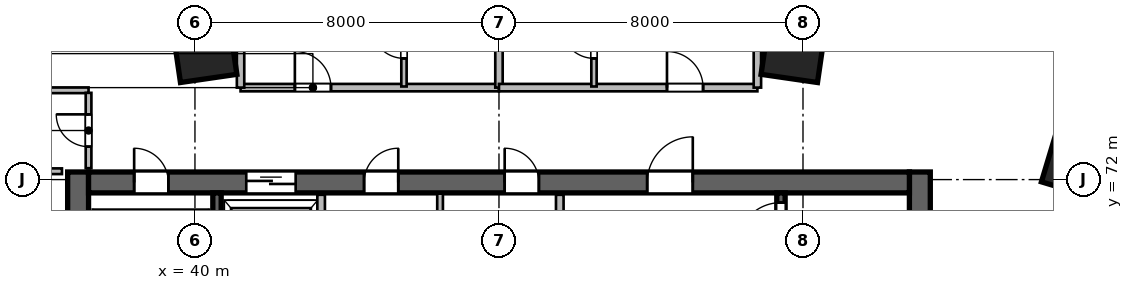
"""IFC4 building model, lengths in metres.
Left out: names, types, materials, properties, quantities, classifications, styles, units other than length and angle.
Written with IfcOpenShell. Run it as: python <this file> out.ifc"""

import sys

from ifc_helpers import new_model, si_unit, direction, frame, frame_2d, origin, origin_2d, place, context, subcontext, project, spatial, rectangle, extrude, source, transform, mapped, element, fill, save


model = new_model("IFC4")
c1 = context("Model", 3, precision=1e-05, world=origin(), true_north=direction((0.0, 1.0)))
c2 = subcontext(c1, "Body", "Model", "MODEL_VIEW")
j1 = project(units=[si_unit("LENGTHUNIT", "METRE"), si_unit("PLANEANGLEUNIT", "RADIAN")], contexts=[c1])
p1 = place(None, origin())
s1 = spatial("IfcSite", under=j1, at=p1, CompositionType="ELEMENT")
p2 = place(p1, origin())
s2 = spatial("IfcBuilding", under=s1, at=p2, CompositionType="ELEMENT")
p3 = place(p2, frame((0.0, 0.0, 42.6)))
s3 = spatial("IfcBuildingStorey", under=s2, at=p3, CompositionType="ELEMENT", Elevation=42.6)
m1 = source(origin(), c2, "Body", "SweptSolid", [
    extrude(rectangle(XDim=12.0, YDim=0.55, at=frame_2d((6.0, 0.0))), origin(), (0.0, 0.0, 1.0), 3.6),
])
for number, where, z_axis, x_axis in (
    (1, (36.925, 60.2, 0.0), (0.0, 0.0, 1.0), (0.0, 1.0, 0.0)),
    (2, (59.075, 60.2, 0.0), (0.0, 0.0, 1.0), (0.0, 1.0, 0.0)),
):
    element("IfcWall", number, at=place(p3, frame(where, z_axis=z_axis, x_axis=x_axis)), inside=s3, PredefinedType="SHEAR", context=c2, shape_type="MappedRepresentation", body=[
        mapped(m1, transform((0.0, 0.0, 0.0), scale=1.0)),
    ])
m2 = source(origin(), c2, "Body", "SweptSolid", [
    extrude(rectangle(XDim=21.6, YDim=0.55, at=frame_2d((10.8, 0.0))), origin(), (0.0, 0.0, 1.0), 3.6),
])
p4 = place(p3, frame((37.2, 71.925, 0.0), z_axis=(0.0, 0.0, 1.0), x_axis=(1.0, 0.0, 0.0)))
e3 = element("IfcWall", 3, at=p4, inside=s3, PredefinedType="SHEAR", context=c2, shape_type="MappedRepresentation", body=[
    mapped(m2, transform((0.0, 0.0, 0.0), scale=1.0)),
])
p5 = place(p4, frame((1.2, 0.0, 0.0)))
e4 = element("IfcOpeningElement", 4, at=p5, cuts=e3, PredefinedType="OPENING", context=c2, shape_type="SweptSolid", body=[
    extrude(rectangle(XDim=0.9, YDim=2.1, at=frame_2d((0.45, 1.05))), frame((0.0, 0.285, 0.0), z_axis=(0.0, -1.0, 0.0), x_axis=(1.0, 0.0, 0.0)), (0.0, 0.0, 1.0), 0.57),
])
p6 = place(p4, frame((14.7, 0.0, 0.0)))
e5 = element("IfcOpeningElement", 5, at=p6, cuts=e3, PredefinedType="OPENING", context=c2, shape_type="SweptSolid", body=[
    extrude(rectangle(XDim=1.2, YDim=2.15, at=frame_2d((0.6, 1.075))), frame((0.0, 0.285, 0.0), z_axis=(0.0, -1.0, 0.0), x_axis=(1.0, 0.0, 0.0)), (0.0, 0.0, 1.0), 0.57),
])
p7 = place(p4, frame((4.15, 0.0, 0.0)))
e6 = element("IfcOpeningElement", 6, at=p7, cuts=e3, PredefinedType="OPENING", context=c2, shape_type="SweptSolid", body=[
    extrude(rectangle(XDim=1.3, YDim=2.15, at=frame_2d((0.65, 1.075))), frame((0.0, 0.285, 0.0), z_axis=(0.0, -1.0, 0.0), x_axis=(1.0, 0.0, 0.0)), (0.0, 0.0, 1.0), 0.57),
])
p8 = place(p4, frame((7.25, 0.0, 0.0)))
e7 = element("IfcOpeningElement", 7, at=p8, cuts=e3, PredefinedType="OPENING", context=c2, shape_type="SweptSolid", body=[
    extrude(rectangle(XDim=0.9, YDim=2.1, at=frame_2d((0.45, 1.05))), frame((0.0, 0.285, 0.0), z_axis=(0.0, -1.0, 0.0), x_axis=(1.0, 0.0, 0.0)), (0.0, 0.0, 1.0), 0.57),
])
p9 = place(p4, frame((10.95, 0.0, 0.0)))
e8 = element("IfcOpeningElement", 8, at=p9, cuts=e3, PredefinedType="OPENING", context=c2, shape_type="SweptSolid", body=[
    extrude(rectangle(XDim=0.9, YDim=2.1, at=frame_2d((0.45, 1.05))), frame((0.0, 0.285, 0.0), z_axis=(0.0, -1.0, 0.0), x_axis=(1.0, 0.0, 0.0)), (0.0, 0.0, 1.0), 0.57),
])
m3 = source(origin(), c2, "Body", "SweptSolid", [
    extrude(rectangle(XDim=10.9, YDim=0.22, at=frame_2d((5.45, 0.0))), origin(), (0.0, 0.0, 1.0), 3.6),
])
p10 = place(p3, frame((40.58, 60.75, 0.0), z_axis=(0.0, 0.0, 1.0), x_axis=(0.0, 1.0, 0.0)))
e9 = element("IfcWall", 9, at=p10, inside=s3, PredefinedType="SHEAR", context=c2, shape_type="MappedRepresentation", body=[
    mapped(m3, transform((0.0, 0.0, 0.0), scale=1.0)),
])
p11 = place(p3, frame((55.42, 60.75, 0.0), z_axis=(0.0, 0.0, 1.0), x_axis=(0.0, 1.0, 0.0)))
e10 = element("IfcWall", 10, at=p11, inside=s3, PredefinedType="SHEAR", context=c2, shape_type="MappedRepresentation", body=[
    mapped(m3, transform((0.0, 0.0, 0.0), scale=1.0)),
])
p12 = place(p11, frame((9.495, 0.0, 0.0)))
e11 = element("IfcOpeningElement", 11, at=p12, cuts=e10, PredefinedType="OPENING", context=c2, shape_type="SweptSolid", body=[
    extrude(rectangle(XDim=1.15, YDim=2.15, at=frame_2d((0.575, 1.075))), frame((0.0, 0.12, 0.0), z_axis=(0.0, -1.0, 0.0), x_axis=(1.0, 0.0, 0.0)), (0.0, 0.0, 1.0), 0.24),
])
m4 = source(origin(), c2, "Body", "SweptSolid", [
    extrude(rectangle(XDim=1.5, YDim=1.5, at=origin_2d()), origin(), (0.0, 0.0, 1.0), 3.6),
])
for number, where, z_axis, x_axis in (
    (12, (40.253, 75.404, 0.0), (0.0, 0.0, 1.0), (-0.143, 0.99, 0.0)),
    (13, (55.747, 75.404, 0.0), (0.0, 0.0, 1.0), (0.143, 0.99, 0.0)),
    (14, (63.209, 72.442, 0.0), (0.0, 0.0, 1.0), (0.289, 0.957, 0.0)),
):
    element("IfcColumn", number, at=place(p3, frame(where, z_axis=z_axis, x_axis=x_axis)), inside=s3, PredefinedType="COLUMN", context=c2, shape_type="MappedRepresentation", body=[
        mapped(m4, transform((0.0, 0.0, 0.0), scale=1.0)),
    ])
m5 = source(origin(), c2, "Body", "SweptSolid", [
    extrude(rectangle(XDim=5.8, YDim=0.2, at=frame_2d((2.9, 0.0))), origin(), (0.0, 0.0, 1.0), 3.36),
])
p13 = place(p3, frame((49.6, 65.8, 0.0), z_axis=(0.0, 0.0, 1.0), x_axis=(0.0, 1.0, 0.0)))
e15 = element("IfcWall", 15, at=p13, inside=s3, PredefinedType="SOLIDWALL", context=c2, shape_type="MappedRepresentation", body=[
    mapped(m5, transform((0.0, 0.0, 0.0), scale=1.0)),
])
m6 = source(origin(), c2, "Body", "SweptSolid", [
    extrude(rectangle(XDim=3.2, YDim=0.2, at=frame_2d((1.6, 0.0))), origin(), (0.0, 0.0, 1.0), 3.36),
])
p14 = place(p3, frame((43.32, 68.4, 0.0), z_axis=(0.0, 0.0, 1.0), x_axis=(0.0, 1.0, 0.0)))
e16 = element("IfcWall", 16, at=p14, inside=s3, PredefinedType="SOLIDWALL", context=c2, shape_type="MappedRepresentation", body=[
    mapped(m6, transform((0.0, 0.0, 0.0), scale=1.0)),
])
m7 = source(origin(), c2, "Body", "SweptSolid", [
    extrude(rectangle(XDim=3.23, YDim=0.15, at=frame_2d((1.615, 0.0))), origin(), (0.0, 0.0, 1.0), 3.36),
])
p15 = place(p3, frame((46.45, 68.4, 0.0), z_axis=(0.0, 0.0, 1.0), x_axis=(0.0, 1.0, 0.0)))
e17 = element("IfcWall", 17, at=p15, inside=s3, PredefinedType="PARTITIONING", context=c2, shape_type="MappedRepresentation", body=[
    mapped(m7, transform((0.0, 0.0, 0.0), scale=1.0)),
])
m8 = source(origin(), c2, "Body", "SweptSolid", [
    extrude(rectangle(XDim=2.1, YDim=0.15, at=frame_2d((1.05, 0.0))), origin(), (0.0, 0.0, 1.0), 3.36),
])
p16 = place(p3, frame((34.4, 72.22, 0.0), z_axis=(0.0, 0.0, 1.0), x_axis=(1.0, 0.0, 0.0)))
e18 = element("IfcWall", 18, at=p16, inside=s3, PredefinedType="PARTITIONING", context=c2, shape_type="MappedRepresentation", body=[
    mapped(m8, transform((0.0, 0.0, 0.0), scale=1.0)),
])
m9 = source(origin(), c2, "Body", "SweptSolid", [
    extrude(rectangle(XDim=2.8, YDim=0.15, at=frame_2d((1.4, 0.0))), origin(), (0.0, 0.0, 1.0), 3.36),
])
p17 = place(p3, frame((34.4, 74.35, 0.0), z_axis=(0.0, 0.0, 1.0), x_axis=(1.0, 0.0, 0.0)))
e19 = element("IfcWall", 19, at=p17, inside=s3, PredefinedType="PARTITIONING", context=c2, shape_type="MappedRepresentation", body=[
    mapped(m9, transform((0.0, 0.0, 0.0), scale=1.0)),
])
m10 = source(origin(), c2, "Body", "SweptSolid", [
    extrude(rectangle(XDim=1.982, YDim=0.15, at=frame_2d((0.991, 0.0))), origin(), (0.0, 0.0, 1.0), 3.36),
])
p18 = place(p3, frame((37.2, 72.3, 0.0), z_axis=(0.0, 0.0, 1.0), x_axis=(0.0, 1.0, 0.0)))
e20 = element("IfcWall", 20, at=p18, inside=s3, PredefinedType="PARTITIONING", context=c2, shape_type="MappedRepresentation", body=[
    mapped(m10, transform((0.0, 0.0, 0.0), scale=1.0)),
])
p19 = place(p18, frame((0.566, 0.0, 0.0)))
e21 = element("IfcOpeningElement", 21, at=p19, cuts=e20, PredefinedType="OPENING", context=c2, shape_type="SweptSolid", body=[
    extrude(rectangle(XDim=0.85, YDim=2.1, at=frame_2d((0.425, 1.05))), frame((0.0, 0.085, 0.0), z_axis=(0.0, -1.0, 0.0), x_axis=(1.0, 0.0, 0.0)), (0.0, 0.0, 1.0), 0.17),
])
m11 = source(origin(), c2, "Body", "SweptSolid", [
    extrude(rectangle(XDim=6.8, YDim=0.195, at=frame_2d((3.4, 0.0))), origin(), (0.0, 0.0, 1.0), 3.36),
])
p20 = place(p3, frame((41.2, 74.42, 0.0), z_axis=(0.0, 0.0, 1.0), x_axis=(1.0, 0.0, 0.0)))
e22 = element("IfcWall", 22, at=p20, inside=s3, PredefinedType="PARTITIONING", context=c2, shape_type="MappedRepresentation", body=[
    mapped(m11, transform((0.0, 0.0, 0.0), scale=1.0)),
])
p21 = place(p20, frame((1.429, 0.0, 0.0)))
e23 = element("IfcOpeningElement", 23, at=p21, cuts=e22, PredefinedType="OPENING", context=c2, shape_type="SweptSolid", body=[
    extrude(rectangle(XDim=0.95, YDim=2.15, at=frame_2d((0.475, 1.075))), frame((0.0, 0.107, 0.0), z_axis=(0.0, -1.0, 0.0), x_axis=(1.0, 0.0, 0.0)), (0.0, 0.0, 1.0), 0.215),
])
m12 = source(origin(), c2, "Body", "SweptSolid", [
    extrude(rectangle(XDim=6.216, YDim=0.195, at=frame_2d((3.108, 0.0))), origin(), (0.0, 0.0, 1.0), 2.644),
])
p22 = place(p3, frame((48.0, 74.42, 0.0), z_axis=(0.0, 0.0, 1.0), x_axis=(0.0, 1.0, 0.0)))
e24 = element("IfcWall", 24, at=p22, inside=s3, PredefinedType="PARTITIONING", context=c2, shape_type="MappedRepresentation", body=[
    mapped(m12, transform((0.0, 0.0, 0.0), scale=1.0)),
])
m13 = source(origin(), c2, "Body", "SweptSolid", [
    extrude(rectangle(XDim=5.426, YDim=0.195, at=frame_2d((2.713, 0.0))), origin(), (0.0, 0.0, 1.0), 3.36),
])
p23 = place(p3, frame((41.2, 74.42, 0.0), z_axis=(0.0, 0.0, 1.0), x_axis=(0.0, 1.0, 0.0)))
e25 = element("IfcWall", 25, at=p23, inside=s3, PredefinedType="PARTITIONING", context=c2, shape_type="MappedRepresentation", body=[
    mapped(m13, transform((0.0, 0.0, 0.0), scale=1.0)),
])
m14 = source(origin(), c2, "Body", "SweptSolid", [
    extrude(rectangle(XDim=2.33, YDim=0.14, at=frame_2d((1.165, 0.0))), origin(), (0.0, 0.0, 1.0), 3.36),
])
p24 = place(p3, frame((45.5, 74.45, 0.0), z_axis=(0.0, 0.0, 1.0), x_axis=(0.0, 1.0, 0.0)))
e26 = element("IfcWall", 26, at=p24, inside=s3, PredefinedType="PARTITIONING", context=c2, shape_type="MappedRepresentation", body=[
    mapped(m14, transform((0.0, 0.0, 0.0), scale=1.0)),
])
p25 = place(p24, frame((0.74, 0.0, 0.0)))
e27 = element("IfcOpeningElement", 27, at=p25, cuts=e26, PredefinedType="OPENING", context=c2, shape_type="SweptSolid", body=[
    extrude(rectangle(XDim=0.85, YDim=2.05, at=frame_2d((0.425, 1.025))), frame((0.0, 0.08, 0.0), z_axis=(0.0, -1.0, 0.0), x_axis=(1.0, 0.0, 0.0)), (0.0, 0.0, 1.0), 0.16),
])
p26 = place(p3, frame((48.0, 74.42, 0.0), z_axis=(0.0, 0.0, 1.0), x_axis=(1.0, 0.0, 0.0)))
e28 = element("IfcWall", 28, at=p26, inside=s3, PredefinedType="PARTITIONING", context=c2, shape_type="MappedRepresentation", body=[
    mapped(m11, transform((0.0, 0.0, 0.0), scale=1.0)),
])
p27 = place(p26, frame((4.421, 0.0, 0.0)))
e29 = element("IfcOpeningElement", 29, at=p27, cuts=e28, PredefinedType="OPENING", context=c2, shape_type="SweptSolid", body=[
    extrude(rectangle(XDim=0.95, YDim=2.15, at=frame_2d((0.475, 1.075))), frame((0.0, 0.107, 0.0), z_axis=(0.0, -1.0, 0.0), x_axis=(1.0, 0.0, 0.0)), (0.0, 0.0, 1.0), 0.215),
])
p28 = place(p3, frame((54.8, 74.42, 0.0), z_axis=(0.0, 0.0, 1.0), x_axis=(0.0, 1.0, 0.0)))
e30 = element("IfcWall", 30, at=p28, inside=s3, PredefinedType="PARTITIONING", context=c2, shape_type="MappedRepresentation", body=[
    mapped(m13, transform((0.0, 0.0, 0.0), scale=1.0)),
])
p29 = place(p3, frame((50.5, 74.45, 0.0), z_axis=(0.0, 0.0, 1.0), x_axis=(0.0, 1.0, 0.0)))
e31 = element("IfcWall", 31, at=p29, inside=s3, PredefinedType="PARTITIONING", context=c2, shape_type="MappedRepresentation", body=[
    mapped(m14, transform((0.0, 0.0, 0.0), scale=1.0)),
])
p30 = place(p29, frame((0.74, 0.0, 0.0)))
e32 = element("IfcOpeningElement", 32, at=p30, cuts=e31, PredefinedType="OPENING", context=c2, shape_type="SweptSolid", body=[
    extrude(rectangle(XDim=0.85, YDim=2.05, at=frame_2d((0.425, 1.025))), frame((0.0, 0.08, 0.0), z_axis=(0.0, -1.0, 0.0), x_axis=(1.0, 0.0, 0.0)), (0.0, 0.0, 1.0), 0.16),
])
m15 = source(origin(), c2, "Body", "SweptSolid", [
    extrude(rectangle(XDim=0.9, YDim=2.1, at=frame_2d((0.45, 1.05))), frame((0.0, 0.025, 0.0), z_axis=(0.0, -1.0, 0.0), x_axis=(1.0, 0.0, 0.0)), (0.0, 0.0, 1.0), 0.05),
])
p31 = place(p5, origin())
e33 = element("IfcDoor", 33, at=p31, inside=s3, OperationType="SINGLE_SWING_LEFT", PredefinedType="DOOR", context=c2, shape_type="MappedRepresentation", body=[
    mapped(m15, transform((0.0, 0.0, 0.0), scale=1.0)),
])
fill(e4, e33)
m16 = source(origin(), c2, "Body", "SweptSolid", [
    extrude(rectangle(XDim=1.15, YDim=2.15, at=frame_2d((0.575, 1.075))), frame((0.0, 0.025, 0.0), z_axis=(0.0, -1.0, 0.0), x_axis=(1.0, 0.0, 0.0)), (0.0, 0.0, 1.0), 0.05),
])
p32 = place(p12, origin())
e34 = element("IfcDoor", 34, at=p32, inside=s3, OperationType="SINGLE_SWING_LEFT", PredefinedType="DOOR", context=c2, shape_type="MappedRepresentation", body=[
    mapped(m16, transform((0.0, 0.0, 0.0), scale=1.0)),
])
fill(e11, e34)
m17 = source(origin(), c2, "Body", "SweptSolid", [
    extrude(rectangle(XDim=1.2, YDim=2.15, at=frame_2d((0.6, 1.075))), frame((0.0, 0.025, 0.0), z_axis=(0.0, -1.0, 0.0), x_axis=(1.0, 0.0, 0.0)), (0.0, 0.0, 1.0), 0.05),
])
p33 = place(p6, origin())
e35 = element("IfcDoor", 35, at=p33, inside=s3, OperationType="SINGLE_SWING_RIGHT", PredefinedType="DOOR", context=c2, shape_type="MappedRepresentation", body=[
    mapped(m17, transform((0.0, 0.0, 0.0), scale=1.0)),
])
fill(e5, e35)
m18 = source(origin(), c2, "Body", "SweptSolid", [
    extrude(rectangle(XDim=1.3, YDim=2.15, at=frame_2d((0.65, 1.075))), frame((0.0, 0.025, 0.0), z_axis=(0.0, -1.0, 0.0), x_axis=(1.0, 0.0, 0.0)), (0.0, 0.0, 1.0), 0.05),
])
p34 = place(p7, origin())
e36 = element("IfcDoor", 36, at=p34, inside=s3, OperationType="DOUBLE_DOOR_SLIDING", PredefinedType="DOOR", context=c2, shape_type="MappedRepresentation", body=[
    mapped(m18, transform((0.0, 0.0, 0.0), scale=1.0)),
])
fill(e6, e36)
p35 = place(p8, origin())
e37 = element("IfcDoor", 37, at=p35, inside=s3, OperationType="SINGLE_SWING_RIGHT", PredefinedType="DOOR", context=c2, shape_type="MappedRepresentation", body=[
    mapped(m15, transform((0.0, 0.0, 0.0), scale=1.0)),
])
fill(e7, e37)
p36 = place(p9, origin())
e38 = element("IfcDoor", 38, at=p36, inside=s3, OperationType="SINGLE_SWING_LEFT", PredefinedType="DOOR", context=c2, shape_type="MappedRepresentation", body=[
    mapped(m15, transform((0.0, 0.0, 0.0), scale=1.0)),
])
fill(e8, e38)
m19 = source(origin(), c2, "Body", "SweptSolid", [
    extrude(rectangle(XDim=0.85, YDim=2.1, at=frame_2d((0.425, 1.05))), frame((0.0, 0.025, 0.0), z_axis=(0.0, -1.0, 0.0), x_axis=(1.0, 0.0, 0.0)), (0.0, 0.0, 1.0), 0.05),
])
p37 = place(p19, origin())
e39 = element("IfcDoor", 39, at=p37, inside=s3, OperationType="SINGLE_SWING_RIGHT", PredefinedType="DOOR", context=c2, shape_type="MappedRepresentation", body=[
    mapped(m19, transform((0.0, 0.0, 0.0), scale=1.0)),
])
fill(e21, e39)
m20 = source(origin(), c2, "Body", "SweptSolid", [
    extrude(rectangle(XDim=0.95, YDim=2.15, at=frame_2d((0.475, 1.075))), frame((0.0, 0.025, 0.0), z_axis=(0.0, -1.0, 0.0), x_axis=(1.0, 0.0, 0.0)), (0.0, 0.0, 1.0), 0.05),
])
p38 = place(p21, origin())
e40 = element("IfcDoor", 40, at=p38, inside=s3, OperationType="SINGLE_SWING_LEFT", PredefinedType="DOOR", context=c2, shape_type="MappedRepresentation", body=[
    mapped(m20, transform((0.0, 0.0, 0.0), scale=1.0)),
])
fill(e23, e40)
m21 = source(origin(), c2, "Body", "SweptSolid", [
    extrude(rectangle(XDim=0.85, YDim=2.05, at=frame_2d((0.425, 1.025))), frame((0.0, 0.025, 0.0), z_axis=(0.0, -1.0, 0.0), x_axis=(1.0, 0.0, 0.0)), (0.0, 0.0, 1.0), 0.05),
])
p39 = place(p25, origin())
e41 = element("IfcDoor", 41, at=p39, inside=s3, OperationType="SINGLE_SWING_RIGHT", PredefinedType="DOOR", context=c2, shape_type="MappedRepresentation", body=[
    mapped(m21, transform((0.0, 0.0, 0.0), scale=1.0)),
])
fill(e27, e41)
p40 = place(p27, origin())
e42 = element("IfcDoor", 42, at=p40, inside=s3, OperationType="SINGLE_SWING_LEFT", PredefinedType="DOOR", context=c2, shape_type="MappedRepresentation", body=[
    mapped(m20, transform((0.0, 0.0, 0.0), scale=1.0)),
])
fill(e29, e42)
p41 = place(p30, origin())
e43 = element("IfcDoor", 43, at=p41, inside=s3, OperationType="SINGLE_SWING_RIGHT", PredefinedType="DOOR", context=c2, shape_type="MappedRepresentation", body=[
    mapped(m21, transform((0.0, 0.0, 0.0), scale=1.0)),
])
fill(e32, e43)
save(model, sys.argv[1])
